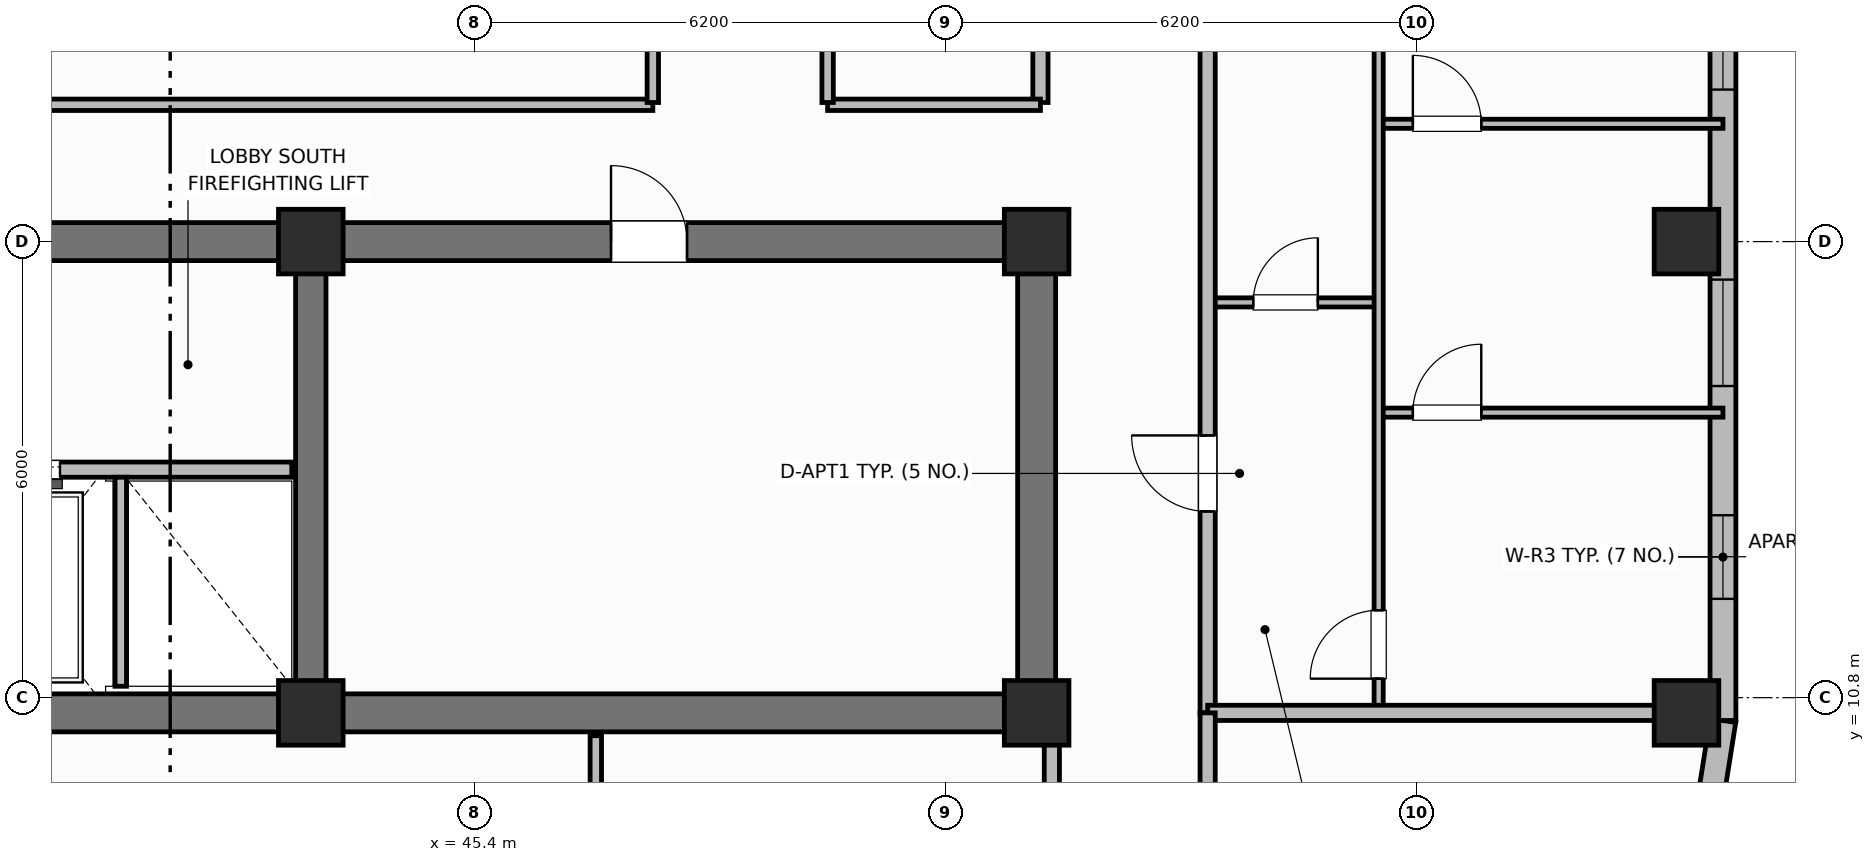
"""IFC4 building model, lengths in metres.
Left out: names, types, materials, properties, quantities, classifications, styles, units other than length and angle.
Written with IfcOpenShell. Run it as: python <this file> out.ifc"""

import sys

from ifc_helpers import new_model, si_unit, direction, frame, frame_2d, origin, origin_2d, place, context, subcontext, project, spatial, rectangle, extrude, element, fill, save


model = new_model("IFC4")
c1 = context("Model", 3, precision=1e-05, world=origin(), true_north=direction((0.0, 1.0)))
c2 = subcontext(c1, "Body", "Model", "MODEL_VIEW")
j1 = project(units=[si_unit("LENGTHUNIT", "METRE"), si_unit("PLANEANGLEUNIT", "RADIAN")], contexts=[c1])
p1 = place(None, origin())
s1 = spatial("IfcSite", under=j1, at=p1, CompositionType="ELEMENT")
p2 = place(p1, origin())
s2 = spatial("IfcBuilding", under=s1, at=p2, CompositionType="ELEMENT")
p3 = place(p2, frame((0.0, 0.0, 211.0)))
s3 = spatial("IfcBuildingStorey", under=s2, at=p3, CompositionType="ELEMENT", Elevation=211.0)
p4 = place(p3, frame((52.8, 10.6, 0.0), z_axis=(0.0, 0.0, 1.0), x_axis=(-1.0, 0.0, 0.0)))
e1 = element("IfcWall", 1, at=p4, inside=s3, PredefinedType="SHEAR", context=c2, shape_type="SweptSolid", body=[
    extrude(rectangle(XDim=27.2, YDim=0.5, at=frame_2d((13.6, 0.0))), origin(), (0.0, 0.0, 1.0), 3.7),
])
p5 = place(p3, frame((52.8, 10.85, 0.0), z_axis=(0.0, 0.0, 1.0), x_axis=(0.0, 1.0, 0.0)))
e2 = element("IfcWall", 2, at=p5, inside=s3, PredefinedType="SHEAR", context=c2, shape_type="SweptSolid", body=[
    extrude(rectangle(XDim=5.7, YDim=0.5, at=frame_2d((2.85, 0.0))), origin(), (0.0, 0.0, 1.0), 3.7),
])
p6 = place(p3, frame((25.6, 16.8, 0.0), z_axis=(0.0, 0.0, 1.0), x_axis=(1.0, 0.0, 0.0)))
e3 = element("IfcWall", 3, at=p6, inside=s3, PredefinedType="SHEAR", context=c2, shape_type="SweptSolid", body=[
    extrude(rectangle(XDim=27.2, YDim=0.5, at=frame_2d((13.6, 0.0))), origin(), (0.0, 0.0, 1.0), 3.7),
])
p7 = place(p6, frame((1.9, 0.0, 0.0)))
e4 = element("IfcOpeningElement", 4, at=p7, cuts=e3, PredefinedType="OPENING", context=c2, shape_type="SweptSolid", body=[
    extrude(rectangle(XDim=1.1, YDim=2.15, at=frame_2d((0.55, 1.075))), frame((0.0, 0.26, 0.0), z_axis=(0.0, -1.0, 0.0), x_axis=(1.0, 0.0, 0.0)), (0.0, 0.0, 1.0), 0.52),
])
p8 = place(p6, frame((13.0, 0.0, 0.0)))
e5 = element("IfcOpeningElement", 5, at=p8, cuts=e3, PredefinedType="OPENING", context=c2, shape_type="SweptSolid", body=[
    extrude(rectangle(XDim=1.2, YDim=2.15, at=frame_2d((0.6, 1.075))), frame((0.0, 0.26, 0.0), z_axis=(0.0, -1.0, 0.0), x_axis=(1.0, 0.0, 0.0)), (0.0, 0.0, 1.0), 0.52),
])
p9 = place(p6, frame((21.6, 0.0, 0.0)))
e6 = element("IfcOpeningElement", 6, at=p9, cuts=e3, PredefinedType="OPENING", context=c2, shape_type="SweptSolid", body=[
    extrude(rectangle(XDim=1.0, YDim=2.15, at=frame_2d((0.5, 1.075))), frame((0.0, 0.26, 0.0), z_axis=(0.0, -1.0, 0.0), x_axis=(1.0, 0.0, 0.0)), (0.0, 0.0, 1.0), 0.52),
])
p10 = place(p3, frame((43.25, 10.85, 0.0), z_axis=(0.0, 0.0, 1.0), x_axis=(0.0, 1.0, 0.0)))
e7 = element("IfcWall", 7, at=p10, inside=s3, PredefinedType="SHEAR", context=c2, shape_type="SweptSolid", body=[
    extrude(rectangle(XDim=5.7, YDim=0.4, at=frame_2d((2.85, 0.0))), origin(), (0.0, 0.0, 1.0), 3.7),
])
for number, where, z_axis, x_axis in (
    (8, (43.25, 10.6, 0.0), (0.0, 0.0, 1.0), (1.0, 0.0, 0.0)),
    (9, (43.25, 16.8, 0.0), (0.0, 0.0, 1.0), (1.0, 0.0, 0.0)),
    (10, (52.8, 10.6, 0.0), (0.0, 0.0, 1.0), (1.0, 0.0, 0.0)),
    (11, (52.8, 16.8, 0.0), (0.0, 0.0, 1.0), (1.0, 0.0, 0.0)),
    (12, (61.35, 10.6, 0.0), (0.0, 0.0, 1.0), (1.0, 0.0, 0.0)),
    (13, (61.35, 16.8, 0.0), (0.0, 0.0, 1.0), (1.0, 0.0, 0.0)),
):
    element("IfcColumn", number, at=place(p3, frame(where, z_axis=z_axis, x_axis=x_axis)), inside=s3, PredefinedType="COLUMN", context=c2, shape_type="SweptSolid", body=[
        extrude(rectangle(XDim=0.85, YDim=0.85, at=origin_2d()), origin(), (0.0, 0.0, 1.0), 3.7),
    ])
p11 = place(p3, frame((61.652, 9.378, 0.0), z_axis=(0.0, 0.0, 1.0), x_axis=(0.156514556949, 0.987675651954, 0.0)))
e14 = element("IfcWall", 14, at=p11, inside=s3, PredefinedType="SOLIDWALL", context=c2, shape_type="SweptSolid", body=[
    extrude(rectangle(XDim=1.135, YDim=0.34, at=frame_2d((0.568, 0.0))), origin(), (0.0, 0.0, 1.0), 2.72),
])
p12 = place(p3, frame((61.83, 10.5, 0.0), z_axis=(0.0, 0.0, 1.0), x_axis=(0.0, 1.0, 0.0)))
e15 = element("IfcWall", 15, at=p12, inside=s3, PredefinedType="SOLIDWALL", context=c2, shape_type="SweptSolid", body=[
    extrude(rectangle(XDim=13.3, YDim=0.34, at=frame_2d((6.65, 0.0))), origin(), (0.0, 0.0, 1.0), 2.72),
])
p13 = place(p12, frame((1.6, 0.0, 0.95)))
e16 = element("IfcOpeningElement", 16, at=p13, cuts=e15, PredefinedType="OPENING", context=c2, shape_type="SweptSolid", body=[
    extrude(rectangle(XDim=1.1, YDim=1.65, at=frame_2d((0.55, 0.825))), frame((0.0, 0.18, 0.0), z_axis=(0.0, -1.0, 0.0), x_axis=(1.0, 0.0, 0.0)), (0.0, 0.0, 1.0), 0.36),
])
p14 = place(p12, frame((4.4, 0.0, 0.71)))
e17 = element("IfcOpeningElement", 17, at=p14, cuts=e15, PredefinedType="OPENING", context=c2, shape_type="SweptSolid", body=[
    extrude(rectangle(XDim=1.4, YDim=1.85, at=frame_2d((0.7, 0.925))), frame((0.0, 0.18, 0.0), z_axis=(0.0, -1.0, 0.0), x_axis=(1.0, 0.0, 0.0)), (0.0, 0.0, 1.0), 0.36),
])
p15 = place(p12, frame((8.3, 0.0, 0.95)))
e18 = element("IfcOpeningElement", 18, at=p15, cuts=e15, PredefinedType="OPENING", context=c2, shape_type="SweptSolid", body=[
    extrude(rectangle(XDim=1.1, YDim=1.65, at=frame_2d((0.55, 0.825))), frame((0.0, 0.18, 0.0), z_axis=(0.0, -1.0, 0.0), x_axis=(1.0, 0.0, 0.0)), (0.0, 0.0, 1.0), 0.36),
])
p16 = place(p12, frame((10.25, 0.0, 0.95)))
e19 = element("IfcOpeningElement", 19, at=p16, cuts=e15, PredefinedType="OPENING", context=c2, shape_type="SweptSolid", body=[
    extrude(rectangle(XDim=1.1, YDim=1.65, at=frame_2d((0.55, 0.825))), frame((0.0, 0.18, 0.0), z_axis=(0.0, -1.0, 0.0), x_axis=(1.0, 0.0, 0.0)), (0.0, 0.0, 1.0), 0.36),
])
p17 = place(p3, frame((35.4, 13.8, 0.0), z_axis=(0.0, 0.0, 1.0), x_axis=(1.0, 0.0, 0.0)))
e20 = element("IfcWall", 20, at=p17, inside=s3, PredefinedType="PARTITIONING", context=c2, shape_type="SweptSolid", body=[
    extrude(rectangle(XDim=7.6, YDim=0.2, at=frame_2d((3.8, 0.0))), origin(), (0.0, 0.0, 1.0), 2.32),
])
p18 = place(p17, frame((0.7, 0.0, 0.0)))
e21 = element("IfcOpeningElement", 21, at=p18, cuts=e20, PredefinedType="OPENING", context=c2, shape_type="SweptSolid", body=[
    extrude(rectangle(XDim=1.1, YDim=2.15, at=frame_2d((0.55, 1.075))), frame((0.0, 0.11, 0.0), z_axis=(0.0, -1.0, 0.0), x_axis=(1.0, 0.0, 0.0)), (0.0, 0.0, 1.0), 0.22),
])
p19 = place(p17, frame((3.35, 0.0, 0.0)))
e22 = element("IfcOpeningElement", 22, at=p19, cuts=e20, PredefinedType="OPENING", context=c2, shape_type="SweptSolid", body=[
    extrude(rectangle(XDim=1.2, YDim=2.15, at=frame_2d((0.6, 1.075))), frame((0.0, 0.11, 0.0), z_axis=(0.0, -1.0, 0.0), x_axis=(1.0, 0.0, 0.0)), (0.0, 0.0, 1.0), 0.22),
])
p20 = place(p3, frame((40.75, 10.95, 0.0), z_axis=(0.0, 0.0, 1.0), x_axis=(0.0, 1.0, 0.0)))
e23 = element("IfcWall", 23, at=p20, inside=s3, PredefinedType="PARTITIONING", context=c2, shape_type="SweptSolid", body=[
    extrude(rectangle(XDim=2.75, YDim=0.15, at=frame_2d((1.375, 0.0))), origin(), (0.0, 0.0, 1.0), 2.55),
])
p21 = place(p3, frame((52.85, 18.63, 0.0), z_axis=(0.0, 0.0, 1.0), x_axis=(0.0, 1.0, 0.0)))
e24 = element("IfcWall", 24, at=p21, inside=s3, PredefinedType="PARTITIONING", context=c2, shape_type="SweptSolid", body=[
    extrude(rectangle(XDim=19.14, YDim=0.2, at=frame_2d((9.57, 0.0))), origin(), (0.0, 0.0, 1.0), 2.55),
])
p22 = place(p3, frame((25.55, 18.6, 0.0), z_axis=(0.0, 0.0, 1.0), x_axis=(1.0, 0.0, 0.0)))
e25 = element("IfcWall", 25, at=p22, inside=s3, PredefinedType="PARTITIONING", context=c2, shape_type="SweptSolid", body=[
    extrude(rectangle(XDim=22.2, YDim=0.15, at=frame_2d((11.1, 0.0))), origin(), (0.0, 0.0, 1.0), 2.55),
])
p23 = place(p3, frame((50.05, 18.6, 0.0), z_axis=(0.0, 0.0, 1.0), x_axis=(1.0, 0.0, 0.0)))
e26 = element("IfcWall", 26, at=p23, inside=s3, PredefinedType="PARTITIONING", context=c2, shape_type="SweptSolid", body=[
    extrude(rectangle(XDim=2.8, YDim=0.15, at=frame_2d((1.4, 0.0))), origin(), (0.0, 0.0, 1.0), 2.55),
])
p24 = place(p3, frame((47.75, 18.63, 0.0), z_axis=(0.0, 0.0, 1.0), x_axis=(0.0, 1.0, 0.0)))
e27 = element("IfcWall", 27, at=p24, inside=s3, PredefinedType="PARTITIONING", context=c2, shape_type="SweptSolid", body=[
    extrude(rectangle(XDim=19.14, YDim=0.15, at=frame_2d((9.57, 0.0))), origin(), (0.0, 0.0, 1.0), 2.55),
])
p25 = place(p24, frame((2.4, 0.0, 0.0)))
e28 = element("IfcOpeningElement", 28, at=p25, cuts=e27, PredefinedType="OPENING", context=c2, shape_type="SweptSolid", body=[
    extrude(rectangle(XDim=0.9, YDim=2.1, at=frame_2d((0.45, 1.05))), frame((0.0, 0.085, 0.0), z_axis=(0.0, -1.0, 0.0), x_axis=(1.0, 0.0, 0.0)), (0.0, 0.0, 1.0), 0.17),
])
p26 = place(p24, frame((9.847, 0.0, 0.0)))
e29 = element("IfcOpeningElement", 29, at=p26, cuts=e27, PredefinedType="OPENING", context=c2, shape_type="SweptSolid", body=[
    extrude(rectangle(XDim=0.9, YDim=2.1, at=frame_2d((0.45, 1.05))), frame((0.0, 0.085, 0.0), z_axis=(0.0, -1.0, 0.0), x_axis=(1.0, 0.0, 0.0)), (0.0, 0.0, 1.0), 0.17),
])
p27 = place(p3, frame((50.05, 18.63, 0.0), z_axis=(0.0, 0.0, 1.0), x_axis=(0.0, 1.0, 0.0)))
e30 = element("IfcWall", 30, at=p27, inside=s3, PredefinedType="PARTITIONING", context=c2, shape_type="SweptSolid", body=[
    extrude(rectangle(XDim=19.14, YDim=0.15, at=frame_2d((9.57, 0.0))), origin(), (0.0, 0.0, 1.0), 2.55),
])
p28 = place(p27, frame((2.2, 0.0, 0.0)))
e31 = element("IfcOpeningElement", 31, at=p28, cuts=e30, PredefinedType="OPENING", context=c2, shape_type="SweptSolid", body=[
    extrude(rectangle(XDim=1.0, YDim=2.15, at=frame_2d((0.5, 1.075))), frame((0.0, 0.085, 0.0), z_axis=(0.0, -1.0, 0.0), x_axis=(1.0, 0.0, 0.0)), (0.0, 0.0, 1.0), 0.17),
])
p29 = place(p27, frame((9.847, 0.0, 0.0)))
e32 = element("IfcOpeningElement", 32, at=p29, cuts=e30, PredefinedType="OPENING", context=c2, shape_type="SweptSolid", body=[
    extrude(rectangle(XDim=1.0, YDim=2.15, at=frame_2d((0.5, 1.075))), frame((0.0, 0.085, 0.0), z_axis=(0.0, -1.0, 0.0), x_axis=(1.0, 0.0, 0.0)), (0.0, 0.0, 1.0), 0.17),
])
p30 = place(p3, frame((55.05, 16.0, 0.0), z_axis=(0.0, 0.0, 1.0), x_axis=(1.0, 0.0, 0.0)))
e33 = element("IfcWall", 33, at=p30, inside=s3, PredefinedType="PARTITIONING", context=c2, shape_type="SweptSolid", body=[
    extrude(rectangle(XDim=2.25, YDim=0.12, at=frame_2d((1.125, 0.0))), origin(), (0.0, 0.0, 1.0), 2.55),
])
p31 = place(p30, frame((0.6, 0.0, 0.0)))
e34 = element("IfcOpeningElement", 34, at=p31, cuts=e33, PredefinedType="OPENING", context=c2, shape_type="SweptSolid", body=[
    extrude(rectangle(XDim=0.85, YDim=2.1, at=frame_2d((0.425, 1.05))), frame((0.0, 0.07, 0.0), z_axis=(0.0, -1.0, 0.0), x_axis=(1.0, 0.0, 0.0)), (0.0, 0.0, 1.0), 0.14),
])
p32 = place(p3, frame((57.3, 14.55, 0.0), z_axis=(0.0, 0.0, 1.0), x_axis=(1.0, 0.0, 0.0)))
e35 = element("IfcWall", 35, at=p32, inside=s3, PredefinedType="PARTITIONING", context=c2, shape_type="SweptSolid", body=[
    extrude(rectangle(XDim=4.53, YDim=0.12, at=frame_2d((2.265, 0.0))), origin(), (0.0, 0.0, 1.0), 2.55),
])
p33 = place(p32, frame((0.45, 0.0, 0.0)))
e36 = element("IfcOpeningElement", 36, at=p33, cuts=e35, PredefinedType="OPENING", context=c2, shape_type="SweptSolid", body=[
    extrude(rectangle(XDim=0.9, YDim=2.1, at=frame_2d((0.45, 1.05))), frame((0.0, 0.07, 0.0), z_axis=(0.0, -1.0, 0.0), x_axis=(1.0, 0.0, 0.0)), (0.0, 0.0, 1.0), 0.14),
])
p34 = place(p3, frame((57.3, 18.35, 0.0), z_axis=(0.0, 0.0, 1.0), x_axis=(1.0, 0.0, 0.0)))
e37 = element("IfcWall", 37, at=p34, inside=s3, PredefinedType="PARTITIONING", context=c2, shape_type="SweptSolid", body=[
    extrude(rectangle(XDim=4.53, YDim=0.12, at=frame_2d((2.265, 0.0))), origin(), (0.0, 0.0, 1.0), 2.55),
])
p35 = place(p34, frame((0.45, 0.0, 0.0)))
e38 = element("IfcOpeningElement", 38, at=p35, cuts=e37, PredefinedType="OPENING", context=c2, shape_type="SweptSolid", body=[
    extrude(rectangle(XDim=0.9, YDim=2.1, at=frame_2d((0.45, 1.05))), frame((0.0, 0.07, 0.0), z_axis=(0.0, -1.0, 0.0), x_axis=(1.0, 0.0, 0.0)), (0.0, 0.0, 1.0), 0.14),
])
p36 = place(p3, frame((57.3, 10.64, 0.0), z_axis=(0.0, 0.0, 1.0), x_axis=(0.0, 1.0, 0.0)))
e39 = element("IfcWall", 39, at=p36, inside=s3, PredefinedType="PARTITIONING", context=c2, shape_type="SweptSolid", body=[
    extrude(rectangle(XDim=11.536, YDim=0.12, at=frame_2d((5.768, 0.0))), origin(), (0.0, 0.0, 1.0), 2.55),
])
p37 = place(p36, frame((0.41, 0.0, 0.0)))
e40 = element("IfcOpeningElement", 40, at=p37, cuts=e39, PredefinedType="OPENING", context=c2, shape_type="SweptSolid", body=[
    extrude(rectangle(XDim=0.9, YDim=2.1, at=frame_2d((0.45, 1.05))), frame((0.0, 0.07, 0.0), z_axis=(0.0, -1.0, 0.0), x_axis=(1.0, 0.0, 0.0)), (0.0, 0.0, 1.0), 0.14),
])
p38 = place(p3, frame((55.05, 10.6, 0.0), z_axis=(0.0, 0.0, 1.0), x_axis=(0.0, 1.0, 0.0)))
e41 = element("IfcWall", 41, at=p38, inside=s3, PredefinedType="PARTITIONING", context=c2, shape_type="SweptSolid", body=[
    extrude(rectangle(XDim=35.2, YDim=0.2, at=frame_2d((17.6, 0.0))), origin(), (0.0, 0.0, 1.0), 2.55),
])
p39 = place(p38, frame((2.65, 0.0, 0.0)))
e42 = element("IfcOpeningElement", 42, at=p39, cuts=e41, PredefinedType="OPENING", context=c2, shape_type="SweptSolid", body=[
    extrude(rectangle(XDim=1.0, YDim=2.15, at=frame_2d((0.5, 1.075))), frame((0.0, 0.11, 0.0), z_axis=(0.0, -1.0, 0.0), x_axis=(1.0, 0.0, 0.0)), (0.0, 0.0, 1.0), 0.22),
])
p40 = place(p38, frame((12.166, 0.0, 0.0)))
e43 = element("IfcOpeningElement", 43, at=p40, cuts=e41, PredefinedType="OPENING", context=c2, shape_type="SweptSolid", body=[
    extrude(rectangle(XDim=1.0, YDim=2.15, at=frame_2d((0.5, 1.075))), frame((0.0, 0.11, 0.0), z_axis=(0.0, -1.0, 0.0), x_axis=(1.0, 0.0, 0.0)), (0.0, 0.0, 1.0), 0.22),
])
p41 = place(p38, frame((23.65, 0.0, 0.0)))
e44 = element("IfcOpeningElement", 44, at=p41, cuts=e41, PredefinedType="OPENING", context=c2, shape_type="SweptSolid", body=[
    extrude(rectangle(XDim=1.0, YDim=2.15, at=frame_2d((0.5, 1.075))), frame((0.0, 0.11, 0.0), z_axis=(0.0, -1.0, 0.0), x_axis=(1.0, 0.0, 0.0)), (0.0, 0.0, 1.0), 0.22),
])
p42 = place(p3, frame((55.05, 10.6, 0.0), z_axis=(0.0, 0.0, 1.0), x_axis=(1.0, 0.0, 0.0)))
e45 = element("IfcWall", 45, at=p42, inside=s3, PredefinedType="PARTITIONING", context=c2, shape_type="SweptSolid", body=[
    extrude(rectangle(XDim=6.36, YDim=0.2, at=frame_2d((3.18, 0.0))), origin(), (0.0, 0.0, 1.0), 2.55),
])
p43 = place(p3, frame((55.05, 6.87, 0.0), z_axis=(0.0, 0.0, 1.0), x_axis=(0.0, 1.0, 0.0)))
e46 = element("IfcWall", 46, at=p43, inside=s3, PredefinedType="PARTITIONING", context=c2, shape_type="SweptSolid", body=[
    extrude(rectangle(XDim=3.73, YDim=0.2, at=frame_2d((1.865, 0.0))), origin(), (0.0, 0.0, 1.0), 2.55),
])
p44 = place(p3, frame((47.0, 6.87, 0.0), z_axis=(0.0, 0.0, 1.0), x_axis=(0.0, 1.0, 0.0)))
e47 = element("IfcWall", 47, at=p44, inside=s3, PredefinedType="PARTITIONING", context=c2, shape_type="SweptSolid", body=[
    extrude(rectangle(XDim=3.43, YDim=0.15, at=frame_2d((1.715, 0.0))), origin(), (0.0, 0.0, 1.0), 2.55),
])
p45 = place(p44, frame((1.35, 0.0, 0.0)))
e48 = element("IfcOpeningElement", 48, at=p45, cuts=e47, PredefinedType="OPENING", context=c2, shape_type="SweptSolid", body=[
    extrude(rectangle(XDim=0.9, YDim=2.1, at=frame_2d((0.45, 1.05))), frame((0.0, 0.085, 0.0), z_axis=(0.0, -1.0, 0.0), x_axis=(1.0, 0.0, 0.0)), (0.0, 0.0, 1.0), 0.17),
])
p46 = place(p3, frame((53.0, 7.57, 0.0), z_axis=(0.0, 0.0, 1.0), x_axis=(0.0, 1.0, 0.0)))
e49 = element("IfcWall", 49, at=p46, inside=s3, PredefinedType="PARTITIONING", context=c2, shape_type="SweptSolid", body=[
    extrude(rectangle(XDim=2.73, YDim=0.2, at=frame_2d((1.365, 0.0))), origin(), (0.0, 0.0, 1.0), 2.55),
])
p47 = place(p46, frame((0.65, 0.0, 0.0)))
e50 = element("IfcOpeningElement", 50, at=p47, cuts=e49, PredefinedType="OPENING", context=c2, shape_type="SweptSolid", body=[
    extrude(rectangle(XDim=0.9, YDim=2.1, at=frame_2d((0.45, 1.05))), frame((0.0, 0.11, 0.0), z_axis=(0.0, -1.0, 0.0), x_axis=(1.0, 0.0, 0.0)), (0.0, 0.0, 1.0), 0.22),
])
p48 = place(p13, origin())
e51 = element("IfcWindow", 51, at=p48, inside=s3, PartitioningType="SINGLE_PANEL", PredefinedType="WINDOW", context=c2, shape_type="SweptSolid", body=[
    extrude(rectangle(XDim=1.1, YDim=1.65, at=frame_2d((0.55, 0.825))), frame((0.0, 0.03, 0.0), z_axis=(0.0, -1.0, 0.0), x_axis=(1.0, 0.0, 0.0)), (0.0, 0.0, 1.0), 0.06),
])
fill(e16, e51)
p49 = place(p14, origin())
e52 = element("IfcWindow", 52, at=p49, inside=s3, PartitioningType="SINGLE_PANEL", PredefinedType="WINDOW", context=c2, shape_type="SweptSolid", body=[
    extrude(rectangle(XDim=1.4, YDim=1.85, at=frame_2d((0.7, 0.925))), frame((0.0, 0.03, 0.0), z_axis=(0.0, -1.0, 0.0), x_axis=(1.0, 0.0, 0.0)), (0.0, 0.0, 1.0), 0.06),
])
fill(e17, e52)
p50 = place(p15, origin())
e53 = element("IfcWindow", 53, at=p50, inside=s3, PartitioningType="SINGLE_PANEL", PredefinedType="WINDOW", context=c2, shape_type="SweptSolid", body=[
    extrude(rectangle(XDim=1.1, YDim=1.65, at=frame_2d((0.55, 0.825))), frame((0.0, 0.03, 0.0), z_axis=(0.0, -1.0, 0.0), x_axis=(1.0, 0.0, 0.0)), (0.0, 0.0, 1.0), 0.06),
])
fill(e18, e53)
p51 = place(p19, origin())
e54 = element("IfcDoor", 54, at=p51, inside=s3, OperationType="SLIDING_TO_LEFT", PredefinedType="DOOR", context=c2, shape_type="SweptSolid", body=[
    extrude(rectangle(XDim=1.2, YDim=2.15, at=frame_2d((0.6, 1.075))), frame((0.0, 0.025, 0.0), z_axis=(0.0, -1.0, 0.0), x_axis=(1.0, 0.0, 0.0)), (0.0, 0.0, 1.0), 0.05),
])
fill(e22, e54)
p52 = place(p31, origin())
e55 = element("IfcDoor", 55, at=p52, inside=s3, OperationType="SINGLE_SWING_RIGHT", PredefinedType="DOOR", context=c2, shape_type="SweptSolid", body=[
    extrude(rectangle(XDim=0.85, YDim=2.1, at=frame_2d((0.425, 1.05))), frame((0.0, 0.025, 0.0), z_axis=(0.0, -1.0, 0.0), x_axis=(1.0, 0.0, 0.0)), (0.0, 0.0, 1.0), 0.05),
])
fill(e34, e55)
p53 = place(p33, origin())
e56 = element("IfcDoor", 56, at=p53, inside=s3, OperationType="SINGLE_SWING_RIGHT", PredefinedType="DOOR", context=c2, shape_type="SweptSolid", body=[
    extrude(rectangle(XDim=0.9, YDim=2.1, at=frame_2d((0.45, 1.05))), frame((0.0, 0.025, 0.0), z_axis=(0.0, -1.0, 0.0), x_axis=(1.0, 0.0, 0.0)), (0.0, 0.0, 1.0), 0.05),
])
fill(e36, e56)
p54 = place(p35, origin())
e57 = element("IfcDoor", 57, at=p54, inside=s3, OperationType="SINGLE_SWING_LEFT", PredefinedType="DOOR", context=c2, shape_type="SweptSolid", body=[
    extrude(rectangle(XDim=0.9, YDim=2.1, at=frame_2d((0.45, 1.05))), frame((0.0, 0.025, 0.0), z_axis=(0.0, -1.0, 0.0), x_axis=(1.0, 0.0, 0.0)), (0.0, 0.0, 1.0), 0.05),
])
fill(e38, e57)
p55 = place(p37, origin())
e58 = element("IfcDoor", 58, at=p55, inside=s3, OperationType="SINGLE_SWING_LEFT", PredefinedType="DOOR", context=c2, shape_type="SweptSolid", body=[
    extrude(rectangle(XDim=0.9, YDim=2.1, at=frame_2d((0.45, 1.05))), frame((0.0, 0.025, 0.0), z_axis=(0.0, -1.0, 0.0), x_axis=(1.0, 0.0, 0.0)), (0.0, 0.0, 1.0), 0.05),
])
fill(e40, e58)
p56 = place(p39, origin())
e59 = element("IfcDoor", 59, at=p56, inside=s3, OperationType="SINGLE_SWING_RIGHT", PredefinedType="DOOR", context=c2, shape_type="SweptSolid", body=[
    extrude(rectangle(XDim=1.0, YDim=2.15, at=frame_2d((0.5, 1.075))), frame((0.0, 0.025, 0.0), z_axis=(0.0, -1.0, 0.0), x_axis=(1.0, 0.0, 0.0)), (0.0, 0.0, 1.0), 0.05),
])
fill(e42, e59)
p57 = place(p9, origin())
e60 = element("IfcDoor", 60, at=p57, inside=s3, OperationType="SINGLE_SWING_LEFT", PredefinedType="DOOR", context=c2, shape_type="SweptSolid", body=[
    extrude(rectangle(XDim=1.0, YDim=2.15, at=frame_2d((0.5, 1.075))), frame((0.0, 0.025, 0.0), z_axis=(0.0, -1.0, 0.0), x_axis=(1.0, 0.0, 0.0)), (0.0, 0.0, 1.0), 0.05),
])
fill(e6, e60)
save(model, sys.argv[1])
